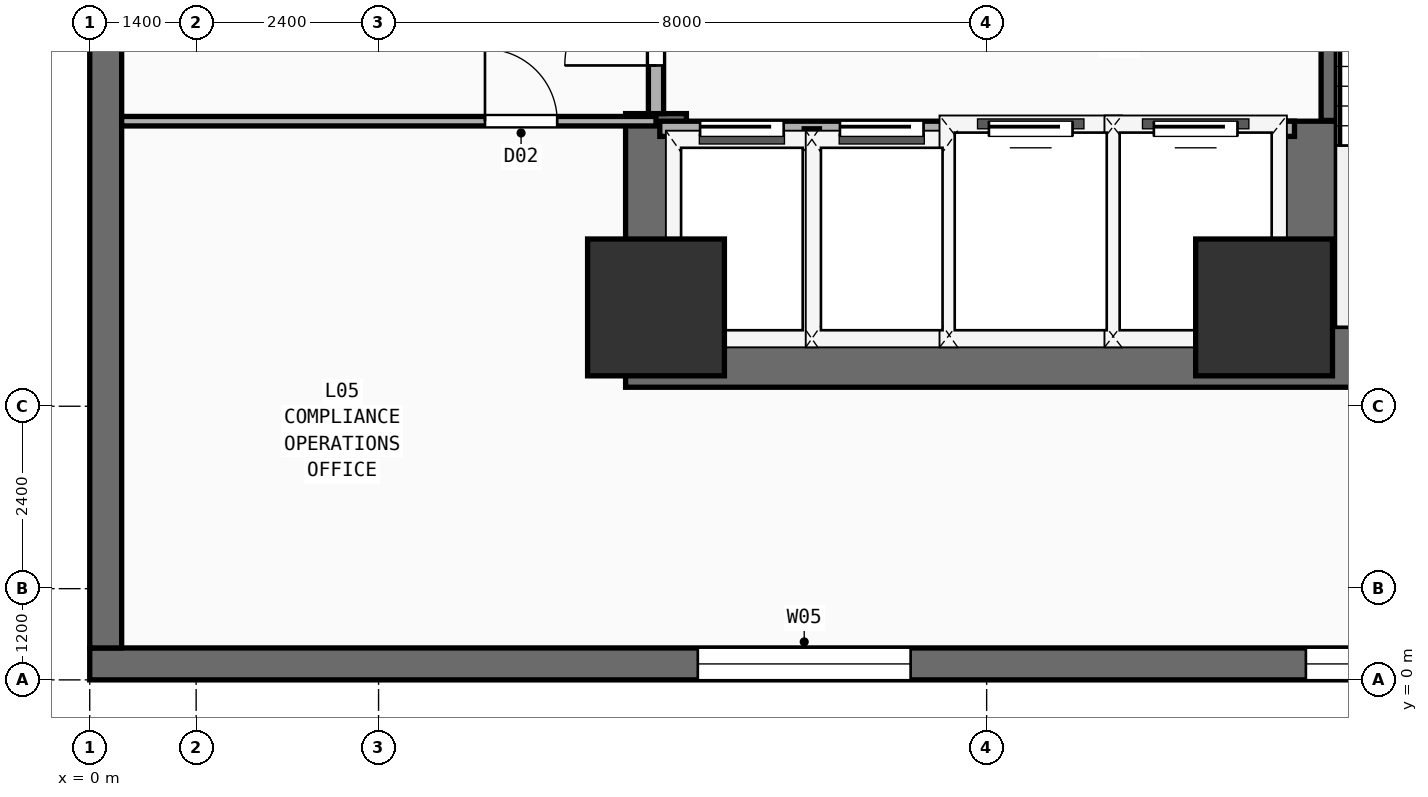
"""IFC4 building model, lengths in metres.
Left out: names, types, materials, properties, quantities, classifications, styles, units other than length and angle.
Written with IfcOpenShell. Run it as: python <this file> out.ifc"""

import sys

from ifc_helpers import new_model, si_unit, direction, frame, frame_2d, origin, origin_2d, place, context, subcontext, project, spatial, rectangle, extrude, element, fill, save


model = new_model("IFC4")
c1 = context("Model", 3, precision=1e-05, world=origin(), true_north=direction((0.0, 1.0)))
c2 = subcontext(c1, "Body", "Model", "MODEL_VIEW")
j1 = project(units=[si_unit("LENGTHUNIT", "METRE"), si_unit("PLANEANGLEUNIT", "RADIAN")], contexts=[c1])
p1 = place(None, origin())
s1 = spatial("IfcSite", under=j1, at=p1, CompositionType="ELEMENT")
p2 = place(p1, origin())
s2 = spatial("IfcBuilding", under=s1, at=p2, CompositionType="ELEMENT")
p3 = place(p2, frame((0.0, 0.0, 20.0)))
s3 = spatial("IfcBuildingStorey", under=s2, at=p3, CompositionType="ELEMENT", Elevation=20.0)
p4 = place(p3, frame((7.05, 4.25, 0.0), z_axis=(0.0, 0.0, 1.0), x_axis=(1.0, 0.0, 0.0)))
e1 = element("IfcWall", 1, at=p4, inside=s3, PredefinedType="SHEAR", context=c2, shape_type="SweptSolid", body=[
    extrude(rectangle(XDim=14.15, YDim=0.8, at=frame_2d((7.075, 0.0))), origin(), (0.0, 0.0, 1.0), 4.46),
])
p5 = place(p3, frame((7.45, 4.65, 0.0), z_axis=(0.0, 0.0, 1.0), x_axis=(0.0, 1.0, 0.0)))
e2 = element("IfcWall", 2, at=p5, inside=s3, PredefinedType="SHEAR", context=c2, shape_type="SweptSolid", body=[
    extrude(rectangle(XDim=2.8, YDim=0.8, at=frame_2d((1.4, 0.0))), origin(), (0.0, 0.0, 1.0), 4.46),
])
p6 = place(p3, frame((16.0, 4.65, 0.0), z_axis=(0.0, 0.0, 1.0), x_axis=(0.0, 1.0, 0.0)))
e3 = element("IfcWall", 3, at=p6, inside=s3, PredefinedType="SHEAR", context=c2, shape_type="SweptSolid", body=[
    extrude(rectangle(XDim=2.7, YDim=0.8, at=frame_2d((1.35, 0.0))), origin(), (0.0, 0.0, 1.0), 4.46),
])
for number, where, z_axis, x_axis in (
    (4, (7.45, 4.9, 0.0), (0.0, 0.0, 1.0), (1.0, 0.0, 0.0)),
    (5, (15.45, 4.9, 0.0), (0.0, 0.0, 1.0), (1.0, 0.0, 0.0)),
):
    element("IfcColumn", number, at=place(p3, frame(where, z_axis=z_axis, x_axis=x_axis)), inside=s3, PredefinedType="COLUMN", context=c2, shape_type="SweptSolid", body=[
        extrude(rectangle(XDim=1.8, YDim=1.8, at=origin_2d()), origin(), (0.0, 0.0, 1.0), 4.46),
    ])
p7 = place(p3, frame((0.0, 0.21, 0.0), z_axis=(0.0, 0.0, 1.0), x_axis=(1.0, 0.0, 0.0)))
e6 = element("IfcWall", 6, at=p7, inside=s3, PredefinedType="SOLIDWALL", context=c2, shape_type="SweptSolid", body=[
    extrude(rectangle(XDim=64.8, YDim=0.42, at=frame_2d((32.4, 0.0))), origin(), (0.0, 0.0, 1.0), 4.46),
])
p8 = place(p7, frame((8.0, 0.0, 0.95)))
e7 = element("IfcOpeningElement", 7, at=p8, cuts=e6, PredefinedType="OPENING", context=c2, shape_type="SweptSolid", body=[
    extrude(rectangle(XDim=2.8, YDim=2.4, at=frame_2d((1.4, 1.2))), frame((0.0, 0.22, 0.0), z_axis=(0.0, -1.0, 0.0), x_axis=(1.0, 0.0, 0.0)), (0.0, 0.0, 1.0), 0.44),
])
p9 = place(p7, frame((16.0, 0.0, 0.95)))
e8 = element("IfcOpeningElement", 8, at=p9, cuts=e6, PredefinedType="OPENING", context=c2, shape_type="SweptSolid", body=[
    extrude(rectangle(XDim=2.8, YDim=2.4, at=frame_2d((1.4, 1.2))), frame((0.0, 0.22, 0.0), z_axis=(0.0, -1.0, 0.0), x_axis=(1.0, 0.0, 0.0)), (0.0, 0.0, 1.0), 0.44),
])
p10 = place(p7, frame((24.0, 0.0, 0.95)))
e9 = element("IfcOpeningElement", 9, at=p10, cuts=e6, PredefinedType="OPENING", context=c2, shape_type="SweptSolid", body=[
    extrude(rectangle(XDim=2.8, YDim=2.4, at=frame_2d((1.4, 1.2))), frame((0.0, 0.22, 0.0), z_axis=(0.0, -1.0, 0.0), x_axis=(1.0, 0.0, 0.0)), (0.0, 0.0, 1.0), 0.44),
])
p11 = place(p7, frame((34.0, 0.0, 0.95)))
e10 = element("IfcOpeningElement", 10, at=p11, cuts=e6, PredefinedType="OPENING", context=c2, shape_type="SweptSolid", body=[
    extrude(rectangle(XDim=2.8, YDim=2.4, at=frame_2d((1.4, 1.2))), frame((0.0, 0.22, 0.0), z_axis=(0.0, -1.0, 0.0), x_axis=(1.0, 0.0, 0.0)), (0.0, 0.0, 1.0), 0.44),
])
p12 = place(p7, frame((44.5, 0.0, 0.95)))
e11 = element("IfcOpeningElement", 11, at=p12, cuts=e6, PredefinedType="OPENING", context=c2, shape_type="SweptSolid", body=[
    extrude(rectangle(XDim=2.8, YDim=2.4, at=frame_2d((1.4, 1.2))), frame((0.0, 0.22, 0.0), z_axis=(0.0, -1.0, 0.0), x_axis=(1.0, 0.0, 0.0)), (0.0, 0.0, 1.0), 0.44),
])
p13 = place(p7, frame((58.0, 0.0, 0.95)))
e12 = element("IfcOpeningElement", 12, at=p13, cuts=e6, PredefinedType="OPENING", context=c2, shape_type="SweptSolid", body=[
    extrude(rectangle(XDim=2.8, YDim=2.4, at=frame_2d((1.4, 1.2))), frame((0.0, 0.22, 0.0), z_axis=(0.0, -1.0, 0.0), x_axis=(1.0, 0.0, 0.0)), (0.0, 0.0, 1.0), 0.44),
])
p14 = place(p3, frame((0.21, 0.42, 0.0), z_axis=(0.0, 0.0, 1.0), x_axis=(0.0, 1.0, 0.0)))
e13 = element("IfcWall", 13, at=p14, inside=s3, PredefinedType="SOLIDWALL", context=c2, shape_type="SweptSolid", body=[
    extrude(rectangle(XDim=50.78, YDim=0.42, at=frame_2d((25.39, 0.0))), origin(), (0.0, 0.0, 1.0), 4.46),
])
p15 = place(p14, frame((8.0, 0.0, 0.95)))
e14 = element("IfcOpeningElement", 14, at=p15, cuts=e13, PredefinedType="OPENING", context=c2, shape_type="SweptSolid", body=[
    extrude(rectangle(XDim=2.8, YDim=2.4, at=frame_2d((1.4, 1.2))), frame((0.0, 0.22, 0.0), z_axis=(0.0, -1.0, 0.0), x_axis=(1.0, 0.0, 0.0)), (0.0, 0.0, 1.0), 0.44),
])
p16 = place(p14, frame((18.0, 0.0, 0.95)))
e15 = element("IfcOpeningElement", 15, at=p16, cuts=e13, PredefinedType="OPENING", context=c2, shape_type="SweptSolid", body=[
    extrude(rectangle(XDim=2.8, YDim=2.4, at=frame_2d((1.4, 1.2))), frame((0.0, 0.22, 0.0), z_axis=(0.0, -1.0, 0.0), x_axis=(1.0, 0.0, 0.0)), (0.0, 0.0, 1.0), 0.44),
])
p17 = place(p14, frame((27.5, 0.0, 0.95)))
e16 = element("IfcOpeningElement", 16, at=p17, cuts=e13, PredefinedType="OPENING", context=c2, shape_type="SweptSolid", body=[
    extrude(rectangle(XDim=2.8, YDim=2.4, at=frame_2d((1.4, 1.2))), frame((0.0, 0.22, 0.0), z_axis=(0.0, -1.0, 0.0), x_axis=(1.0, 0.0, 0.0)), (0.0, 0.0, 1.0), 0.44),
])
p18 = place(p14, frame((45.0, 0.0, 0.95)))
e17 = element("IfcOpeningElement", 17, at=p18, cuts=e13, PredefinedType="OPENING", context=c2, shape_type="SweptSolid", body=[
    extrude(rectangle(XDim=2.8, YDim=2.4, at=frame_2d((1.4, 1.2))), frame((0.0, 0.22, 0.0), z_axis=(0.0, -1.0, 0.0), x_axis=(1.0, 0.0, 0.0)), (0.0, 0.0, 1.0), 0.44),
])
p19 = place(p3, frame((16.3, 7.36, 0.0), z_axis=(0.0, 0.0, 1.0), x_axis=(0.0, 1.0, 0.0)))
e18 = element("IfcWall", 18, at=p19, inside=s3, PredefinedType="SHEAR", context=c2, shape_type="SweptSolid", body=[
    extrude(rectangle(XDim=2.58, YDim=0.2, at=frame_2d((1.29, 0.0))), origin(), (0.0, 0.0, 1.0), 4.46),
])
p20 = place(p3, frame((7.5, 7.25, 0.0), z_axis=(0.0, 0.0, 1.0), x_axis=(1.0, 0.0, 0.0)))
e19 = element("IfcWall", 19, at=p20, inside=s3, PredefinedType="PARTITIONING", context=c2, shape_type="SweptSolid", body=[
    extrude(rectangle(XDim=8.35, YDim=0.2, at=frame_2d((4.175, 0.0))), origin(), (0.0, 0.0, 1.0), 4.46),
])
p21 = place(p20, frame((0.53, 0.0, 0.0)))
e20 = element("IfcOpeningElement", 20, at=p21, cuts=e19, PredefinedType="OPENING", context=c2, shape_type="SweptSolid", body=[
    extrude(rectangle(XDim=1.1, YDim=2.2, at=frame_2d((0.55, 1.1))), frame((0.0, 0.11, 0.0), z_axis=(0.0, -1.0, 0.0), x_axis=(1.0, 0.0, 0.0)), (0.0, 0.0, 1.0), 0.22),
])
p22 = place(p20, frame((2.37, 0.0, 0.0)))
e21 = element("IfcOpeningElement", 21, at=p22, cuts=e19, PredefinedType="OPENING", context=c2, shape_type="SweptSolid", body=[
    extrude(rectangle(XDim=1.1, YDim=2.2, at=frame_2d((0.55, 1.1))), frame((0.0, 0.11, 0.0), z_axis=(0.0, -1.0, 0.0), x_axis=(1.0, 0.0, 0.0)), (0.0, 0.0, 1.0), 0.22),
])
p23 = place(p20, frame((4.33, 0.0, 0.0)))
e22 = element("IfcOpeningElement", 22, at=p23, cuts=e19, PredefinedType="OPENING", context=c2, shape_type="SweptSolid", body=[
    extrude(rectangle(XDim=1.1, YDim=2.2, at=frame_2d((0.55, 1.1))), frame((0.0, 0.11, 0.0), z_axis=(0.0, -1.0, 0.0), x_axis=(1.0, 0.0, 0.0)), (0.0, 0.0, 1.0), 0.22),
])
p24 = place(p20, frame((6.5, 0.0, 0.0)))
e23 = element("IfcOpeningElement", 23, at=p24, cuts=e19, PredefinedType="OPENING", context=c2, shape_type="SweptSolid", body=[
    extrude(rectangle(XDim=1.1, YDim=2.2, at=frame_2d((0.55, 1.1))), frame((0.0, 0.11, 0.0), z_axis=(0.0, -1.0, 0.0), x_axis=(1.0, 0.0, 0.0)), (0.0, 0.0, 1.0), 0.22),
])
for number, where, z_axis, x_axis in (
    (24, (9.5, 4.45, 0.0), (0.0, 0.0, 1.0), (0.0, 1.0, 0.0)),
    (25, (11.36, 4.45, 0.0), (0.0, 0.0, 1.0), (0.0, 1.0, 0.0)),
    (26, (13.46, 4.45, 0.0), (0.0, 0.0, 1.0), (0.0, 1.0, 0.0)),
):
    element("IfcWall", number, at=place(p3, frame(where, z_axis=z_axis, x_axis=x_axis)), inside=s3, PredefinedType="PARTITIONING", context=c2, shape_type="SweptSolid", body=[
        extrude(rectangle(XDim=2.8, YDim=0.2, at=frame_2d((1.4, 0.0))), origin(), (0.0, 0.0, 1.0), 4.46),
    ])
p25 = place(p3, frame((7.45, 7.45, 0.0), z_axis=(0.0, 0.0, 1.0), x_axis=(0.0, 1.0, 0.0)))
e27 = element("IfcWall", 27, at=p25, inside=s3, PredefinedType="PARTITIONING", context=c2, shape_type="SweptSolid", body=[
    extrude(rectangle(XDim=2.3, YDim=0.2, at=frame_2d((1.15, 0.0))), origin(), (0.0, 0.0, 1.0), 3.24),
])
p26 = place(p25, frame((0.633, 0.0, 0.0)))
e28 = element("IfcOpeningElement", 28, at=p26, cuts=e27, PredefinedType="OPENING", context=c2, shape_type="SweptSolid", body=[
    extrude(rectangle(XDim=1.2, YDim=2.25, at=frame_2d((0.6, 1.125))), frame((0.0, 0.11, 0.0), z_axis=(0.0, -1.0, 0.0), x_axis=(1.0, 0.0, 0.0)), (0.0, 0.0, 1.0), 0.22),
])
p27 = place(p3, frame((0.42, 7.35, 0.0), z_axis=(0.0, 0.0, 1.0), x_axis=(1.0, 0.0, 0.0)))
e29 = element("IfcWall", 29, at=p27, inside=s3, PredefinedType="PARTITIONING", context=c2, shape_type="SweptSolid", body=[
    extrude(rectangle(XDim=7.03, YDim=0.125, at=frame_2d((3.515, 0.0))), origin(), (0.0, 0.0, 1.0), 4.46),
])
p28 = place(p27, frame((4.78, 0.0, 0.0)))
e30 = element("IfcOpeningElement", 30, at=p28, cuts=e29, PredefinedType="OPENING", context=c2, shape_type="SweptSolid", body=[
    extrude(rectangle(XDim=0.95, YDim=2.15, at=frame_2d((0.475, 1.075))), frame((0.0, 0.073, 0.0), z_axis=(0.0, -1.0, 0.0), x_axis=(1.0, 0.0, 0.0)), (0.0, 0.0, 1.0), 0.145),
])
p29 = place(p8, origin())
e31 = element("IfcWindow", 31, at=p29, inside=s3, PartitioningType="SINGLE_PANEL", PredefinedType="WINDOW", context=c2, shape_type="SweptSolid", body=[
    extrude(rectangle(XDim=2.8, YDim=2.4, at=frame_2d((1.4, 1.2))), frame((0.0, 0.03, 0.0), z_axis=(0.0, -1.0, 0.0), x_axis=(1.0, 0.0, 0.0)), (0.0, 0.0, 1.0), 0.06),
])
fill(e7, e31)
p30 = place(p9, origin())
e32 = element("IfcWindow", 32, at=p30, inside=s3, PartitioningType="SINGLE_PANEL", PredefinedType="WINDOW", context=c2, shape_type="SweptSolid", body=[
    extrude(rectangle(XDim=2.8, YDim=2.4, at=frame_2d((1.4, 1.2))), frame((0.0, 0.03, 0.0), z_axis=(0.0, -1.0, 0.0), x_axis=(1.0, 0.0, 0.0)), (0.0, 0.0, 1.0), 0.06),
])
fill(e8, e32)
p31 = place(p21, origin())
e33 = element("IfcDoor", 33, at=p31, inside=s3, OperationType="SLIDING_TO_LEFT", PredefinedType="DOOR", context=c2, shape_type="SweptSolid", body=[
    extrude(rectangle(XDim=1.1, YDim=2.2, at=frame_2d((0.55, 1.1))), frame((0.0, 0.025, 0.0), z_axis=(0.0, -1.0, 0.0), x_axis=(1.0, 0.0, 0.0)), (0.0, 0.0, 1.0), 0.05),
])
fill(e20, e33)
p32 = place(p22, origin())
e34 = element("IfcDoor", 34, at=p32, inside=s3, OperationType="SLIDING_TO_LEFT", PredefinedType="DOOR", context=c2, shape_type="SweptSolid", body=[
    extrude(rectangle(XDim=1.1, YDim=2.2, at=frame_2d((0.55, 1.1))), frame((0.0, 0.025, 0.0), z_axis=(0.0, -1.0, 0.0), x_axis=(1.0, 0.0, 0.0)), (0.0, 0.0, 1.0), 0.05),
])
fill(e21, e34)
p33 = place(p23, origin())
e35 = element("IfcDoor", 35, at=p33, inside=s3, OperationType="SLIDING_TO_LEFT", PredefinedType="DOOR", context=c2, shape_type="SweptSolid", body=[
    extrude(rectangle(XDim=1.1, YDim=2.2, at=frame_2d((0.55, 1.1))), frame((0.0, 0.025, 0.0), z_axis=(0.0, -1.0, 0.0), x_axis=(1.0, 0.0, 0.0)), (0.0, 0.0, 1.0), 0.05),
])
fill(e22, e35)
p34 = place(p24, origin())
e36 = element("IfcDoor", 36, at=p34, inside=s3, OperationType="SLIDING_TO_LEFT", PredefinedType="DOOR", context=c2, shape_type="SweptSolid", body=[
    extrude(rectangle(XDim=1.1, YDim=2.2, at=frame_2d((0.55, 1.1))), frame((0.0, 0.025, 0.0), z_axis=(0.0, -1.0, 0.0), x_axis=(1.0, 0.0, 0.0)), (0.0, 0.0, 1.0), 0.05),
])
fill(e23, e36)
p35 = place(p26, frame((1.2, 0.0, 0.0), z_axis=(0.0, 0.0, 1.0), x_axis=(-1.0, 0.0, 0.0)))
e37 = element("IfcDoor", 37, at=p35, inside=s3, OperationType="SINGLE_SWING_RIGHT", PredefinedType="DOOR", context=c2, shape_type="SweptSolid", body=[
    extrude(rectangle(XDim=1.2, YDim=2.25, at=frame_2d((0.6, 1.125))), frame((0.0, 0.025, 0.0), z_axis=(0.0, -1.0, 0.0), x_axis=(1.0, 0.0, 0.0)), (0.0, 0.0, 1.0), 0.05),
])
fill(e28, e37)
p36 = place(p28, origin())
e38 = element("IfcDoor", 38, at=p36, inside=s3, OperationType="SINGLE_SWING_LEFT", PredefinedType="DOOR", context=c2, shape_type="SweptSolid", body=[
    extrude(rectangle(XDim=0.95, YDim=2.15, at=frame_2d((0.475, 1.075))), frame((0.0, 0.025, 0.0), z_axis=(0.0, -1.0, 0.0), x_axis=(1.0, 0.0, 0.0)), (0.0, 0.0, 1.0), 0.05),
])
fill(e30, e38)
save(model, sys.argv[1])
